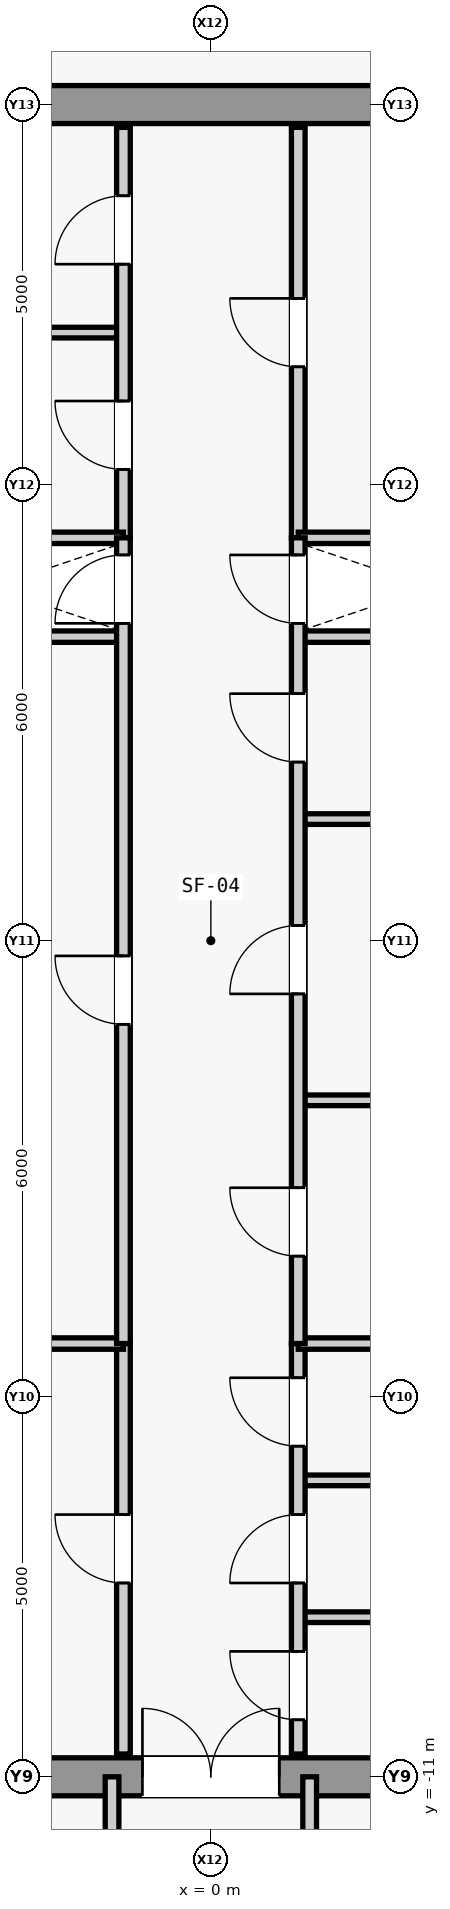
"""IFC4 building model, lengths in metres.
Left out: names, types, materials, properties, quantities, classifications, styles, units other than length and angle.
Written with IfcOpenShell. Run it as: python <this file> out.ifc"""

import sys

from ifc_helpers import new_model, si_unit, direction, frame, frame_2d, origin, place, context, subcontext, project, spatial, rectangle, extrude, source, transform, mapped, element, fill, save


model = new_model("IFC4")
c1 = context("Model", 3, precision=1e-05, world=origin(), true_north=direction((0.0, 1.0)))
c2 = subcontext(c1, "Body", "Model", "MODEL_VIEW")
j1 = project(units=[si_unit("LENGTHUNIT", "METRE"), si_unit("PLANEANGLEUNIT", "RADIAN")], contexts=[c1])
p1 = place(None, origin())
s1 = spatial("IfcSite", under=j1, at=p1, CompositionType="ELEMENT")
p2 = place(p1, origin())
s2 = spatial("IfcBuilding", under=s1, at=p2, CompositionType="ELEMENT")
p3 = place(p2, frame((0.0, 0.0, 342.3)))
s3 = spatial("IfcBuildingStorey", under=s2, at=p3, CompositionType="ELEMENT", Elevation=342.3)
m1 = source(origin(), c2, "Body", "SweptSolid", [
    extrude(rectangle(XDim=9.2, YDim=0.5, at=frame_2d((4.6, 0.0))), origin(), (0.0, 0.0, 1.0), 3.7),
])
p4 = place(p3, frame((-4.6, -11.0, 0.0), z_axis=(0.0, 0.0, 1.0), x_axis=(1.0, 0.0, 0.0)))
e1 = element("IfcWall", 1, at=p4, inside=s3, PredefinedType="SHEAR", context=c2, shape_type="MappedRepresentation", body=[
    mapped(m1, transform((0.0, 0.0, 0.0), scale=1.0)),
])
m2 = source(origin(), c2, "Body", "SweptSolid", [
    extrude(rectangle(XDim=1.8, YDim=2.25, at=frame_2d((0.9, 1.125))), frame((0.0, 0.26, 0.0), z_axis=(0.0, -1.0, 0.0), x_axis=(1.0, 0.0, 0.0)), (0.0, 0.0, 1.0), 0.52),
])
p5 = place(p4, frame((3.7, 0.0, 0.0)))
e2 = element("IfcOpeningElement", 2, at=p5, cuts=e1, PredefinedType="OPENING", context=c2, shape_type="MappedRepresentation", body=[
    mapped(m2, transform((0.0, 0.0, 0.0), scale=1.0)),
])
p6 = place(p3, frame((-4.6, 11.0, 0.0), z_axis=(0.0, 0.0, 1.0), x_axis=(1.0, 0.0, 0.0)))
e3 = element("IfcWall", 3, at=p6, inside=s3, PredefinedType="SHEAR", context=c2, shape_type="MappedRepresentation", body=[
    mapped(m1, transform((0.0, 0.0, 0.0), scale=1.0)),
])
m3 = source(origin(), c2, "Body", "SweptSolid", [
    extrude(rectangle(XDim=3.45, YDim=0.15, at=frame_2d((1.725, 0.0))), origin(), (0.0, 0.0, 1.0), 3.7),
])
for number, where, z_axis, x_axis in (
    (4, (-4.6, 4.0, 0.0), (0.0, 0.0, 1.0), (1.0, 0.0, 0.0)),
    (5, (1.15, 4.0, 0.0), (0.0, 0.0, 1.0), (1.0, 0.0, 0.0)),
):
    element("IfcWall", number, at=place(p3, frame(where, z_axis=z_axis, x_axis=x_axis)), inside=s3, PredefinedType="PARTITIONING", context=c2, shape_type="MappedRepresentation", body=[
        mapped(m3, transform((0.0, 0.0, 0.0), scale=1.0)),
    ])
m4 = source(origin(), c2, "Body", "SweptSolid", [
    extrude(rectangle(XDim=5.4, YDim=0.18, at=frame_2d((2.7, 0.0))), origin(), (0.0, 0.0, 1.0), 3.7),
])
p7 = place(p3, frame((-1.15, -10.7, 0.0), z_axis=(0.0, 0.0, 1.0), x_axis=(0.0, 1.0, 0.0)))
e6 = element("IfcWall", 6, at=p7, inside=s3, PredefinedType="PARTITIONING", context=c2, shape_type="MappedRepresentation", body=[
    mapped(m4, transform((0.0, 0.0, 0.0), scale=1.0)),
])
m5 = source(origin(), c2, "Body", "SweptSolid", [
    extrude(rectangle(XDim=0.9, YDim=2.15, at=frame_2d((0.45, 1.075))), frame((0.0, 0.1, 0.0), z_axis=(0.0, -1.0, 0.0), x_axis=(1.0, 0.0, 0.0)), (0.0, 0.0, 1.0), 0.2),
])
p8 = place(p7, frame((2.25, 0.0, 0.0)))
e7 = element("IfcOpeningElement", 7, at=p8, cuts=e6, PredefinedType="OPENING", context=c2, shape_type="MappedRepresentation", body=[
    mapped(m5, transform((0.0, 0.0, 0.0), scale=1.0)),
])
m6 = source(origin(), c2, "Body", "SweptSolid", [
    extrude(rectangle(XDim=3.45, YDim=0.14, at=frame_2d((1.725, 0.0))), origin(), (0.0, 0.0, 1.0), 3.7),
])
for number, where, z_axis, x_axis in (
    (8, (1.15, -8.9, 0.0), (0.0, 0.0, 1.0), (1.0, 0.0, 0.0)),
    (9, (1.15, -7.1, 0.0), (0.0, 0.0, 1.0), (1.0, 0.0, 0.0)),
):
    element("IfcWall", number, at=place(p3, frame(where, z_axis=z_axis, x_axis=x_axis)), inside=s3, PredefinedType="PARTITIONING", context=c2, shape_type="MappedRepresentation", body=[
        mapped(m6, transform((0.0, 0.0, 0.0), scale=1.0)),
    ])
p9 = place(p3, frame((1.15, -10.7, 0.0), z_axis=(0.0, 0.0, 1.0), x_axis=(0.0, 1.0, 0.0)))
e10 = element("IfcWall", 10, at=p9, inside=s3, PredefinedType="PARTITIONING", context=c2, shape_type="MappedRepresentation", body=[
    mapped(m4, transform((0.0, 0.0, 0.0), scale=1.0)),
])
p10 = place(p9, frame((0.45, 0.0, 0.0)))
e11 = element("IfcOpeningElement", 11, at=p10, cuts=e10, PredefinedType="OPENING", context=c2, shape_type="MappedRepresentation", body=[
    mapped(m5, transform((0.0, 0.0, 0.0), scale=1.0)),
])
p11 = place(p9, frame((2.25, 0.0, 0.0)))
e12 = element("IfcOpeningElement", 12, at=p11, cuts=e10, PredefinedType="OPENING", context=c2, shape_type="MappedRepresentation", body=[
    mapped(m5, transform((0.0, 0.0, 0.0), scale=1.0)),
])
p12 = place(p9, frame((4.05, 0.0, 0.0)))
e13 = element("IfcOpeningElement", 13, at=p12, cuts=e10, PredefinedType="OPENING", context=c2, shape_type="MappedRepresentation", body=[
    mapped(m5, transform((0.0, 0.0, 0.0), scale=1.0)),
])
for number, where, z_axis, x_axis in (
    (14, (-4.6, -5.3, 0.0), (0.0, 0.0, 1.0), (1.0, 0.0, 0.0)),
    (15, (1.15, -5.3, 0.0), (0.0, 0.0, 1.0), (1.0, 0.0, 0.0)),
):
    element("IfcWall", number, at=place(p3, frame(where, z_axis=z_axis, x_axis=x_axis)), inside=s3, PredefinedType="PARTITIONING", context=c2, shape_type="MappedRepresentation", body=[
        mapped(m3, transform((0.0, 0.0, 0.0), scale=1.0)),
    ])
p13 = place(p3, frame((-4.6, 8.0, 0.0), z_axis=(0.0, 0.0, 1.0), x_axis=(1.0, 0.0, 0.0)))
e16 = element("IfcWall", 16, at=p13, inside=s3, PredefinedType="PARTITIONING", context=c2, shape_type="MappedRepresentation", body=[
    mapped(m6, transform((0.0, 0.0, 0.0), scale=1.0)),
])
p14 = place(p3, frame((-1.15, 5.3, 0.0), z_axis=(0.0, 0.0, 1.0), x_axis=(0.0, 1.0, 0.0)))
e17 = element("IfcWall", 17, at=p14, inside=s3, PredefinedType="PARTITIONING", context=c2, shape_type="MappedRepresentation", body=[
    mapped(m4, transform((0.0, 0.0, 0.0), scale=1.0)),
])
p15 = place(p14, frame((0.9, 0.0, 0.0)))
e18 = element("IfcOpeningElement", 18, at=p15, cuts=e17, PredefinedType="OPENING", context=c2, shape_type="MappedRepresentation", body=[
    mapped(m5, transform((0.0, 0.0, 0.0), scale=1.0)),
])
p16 = place(p14, frame((3.6, 0.0, 0.0)))
e19 = element("IfcOpeningElement", 19, at=p16, cuts=e17, PredefinedType="OPENING", context=c2, shape_type="MappedRepresentation", body=[
    mapped(m5, transform((0.0, 0.0, 0.0), scale=1.0)),
])
p17 = place(p3, frame((1.15, 5.3, 0.0), z_axis=(0.0, 0.0, 1.0), x_axis=(0.0, 1.0, 0.0)))
e20 = element("IfcWall", 20, at=p17, inside=s3, PredefinedType="PARTITIONING", context=c2, shape_type="MappedRepresentation", body=[
    mapped(m4, transform((0.0, 0.0, 0.0), scale=1.0)),
])
p18 = place(p17, frame((2.25, 0.0, 0.0)))
e21 = element("IfcOpeningElement", 21, at=p18, cuts=e20, PredefinedType="OPENING", context=c2, shape_type="MappedRepresentation", body=[
    mapped(m5, transform((0.0, 0.0, 0.0), scale=1.0)),
])
for number, where, z_axis, x_axis in (
    (22, (-4.6, 5.3, 0.0), (0.0, 0.0, 1.0), (1.0, 0.0, 0.0)),
    (23, (1.15, 5.3, 0.0), (0.0, 0.0, 1.0), (1.0, 0.0, 0.0)),
):
    element("IfcWall", number, at=place(p3, frame(where, z_axis=z_axis, x_axis=x_axis)), inside=s3, PredefinedType="PARTITIONING", context=c2, shape_type="MappedRepresentation", body=[
        mapped(m3, transform((0.0, 0.0, 0.0), scale=1.0)),
    ])
m7 = source(origin(), c2, "Body", "SweptSolid", [
    extrude(rectangle(XDim=10.6, YDim=0.18, at=frame_2d((5.3, 0.0))), origin(), (0.0, 0.0, 1.0), 3.7),
])
p19 = place(p3, frame((-1.15, -5.3, 0.0), z_axis=(0.0, 0.0, 1.0), x_axis=(0.0, 1.0, 0.0)))
e24 = element("IfcWall", 24, at=p19, inside=s3, PredefinedType="PARTITIONING", context=c2, shape_type="MappedRepresentation", body=[
    mapped(m7, transform((0.0, 0.0, 0.0), scale=1.0)),
])
p20 = place(p19, frame((4.2, 0.0, 0.0)))
e25 = element("IfcOpeningElement", 25, at=p20, cuts=e24, PredefinedType="OPENING", context=c2, shape_type="MappedRepresentation", body=[
    mapped(m5, transform((0.0, 0.0, 0.0), scale=1.0)),
])
p21 = place(p19, frame((9.475, 0.0, 0.0)))
e26 = element("IfcOpeningElement", 26, at=p21, cuts=e24, PredefinedType="OPENING", context=c2, shape_type="MappedRepresentation", body=[
    mapped(m5, transform((0.0, 0.0, 0.0), scale=1.0)),
])
for number, where, z_axis, x_axis in (
    (27, (1.15, -2.1, 0.0), (0.0, 0.0, 1.0), (1.0, 0.0, 0.0)),
    (28, (1.15, 1.6, 0.0), (0.0, 0.0, 1.0), (1.0, 0.0, 0.0)),
):
    element("IfcWall", number, at=place(p3, frame(where, z_axis=z_axis, x_axis=x_axis)), inside=s3, PredefinedType="PARTITIONING", context=c2, shape_type="MappedRepresentation", body=[
        mapped(m6, transform((0.0, 0.0, 0.0), scale=1.0)),
    ])
p22 = place(p3, frame((1.15, -5.3, 0.0), z_axis=(0.0, 0.0, 1.0), x_axis=(0.0, 1.0, 0.0)))
e29 = element("IfcWall", 29, at=p22, inside=s3, PredefinedType="PARTITIONING", context=c2, shape_type="MappedRepresentation", body=[
    mapped(m7, transform((0.0, 0.0, 0.0), scale=1.0)),
])
p23 = place(p22, frame((1.15, 0.0, 0.0)))
e30 = element("IfcOpeningElement", 30, at=p23, cuts=e29, PredefinedType="OPENING", context=c2, shape_type="MappedRepresentation", body=[
    mapped(m5, transform((0.0, 0.0, 0.0), scale=1.0)),
])
p24 = place(p22, frame((4.6, 0.0, 0.0)))
e31 = element("IfcOpeningElement", 31, at=p24, cuts=e29, PredefinedType="OPENING", context=c2, shape_type="MappedRepresentation", body=[
    mapped(m5, transform((0.0, 0.0, 0.0), scale=1.0)),
])
p25 = place(p22, frame((7.65, 0.0, 0.0)))
e32 = element("IfcOpeningElement", 32, at=p25, cuts=e29, PredefinedType="OPENING", context=c2, shape_type="MappedRepresentation", body=[
    mapped(m5, transform((0.0, 0.0, 0.0), scale=1.0)),
])
p26 = place(p22, frame((9.475, 0.0, 0.0)))
e33 = element("IfcOpeningElement", 33, at=p26, cuts=e29, PredefinedType="OPENING", context=c2, shape_type="MappedRepresentation", body=[
    mapped(m5, transform((0.0, 0.0, 0.0), scale=1.0)),
])
m8 = source(origin(), c2, "Body", "SweptSolid", [
    extrude(rectangle(XDim=3.9, YDim=0.18, at=frame_2d((1.95, 0.0))), origin(), (0.0, 0.0, 1.0), 3.7),
])
for number, where, z_axis, x_axis in (
    (34, (-1.3, -14.9, 0.0), (0.0, 0.0, 1.0), (0.0, 1.0, 0.0)),
    (35, (1.3, -14.9, 0.0), (0.0, 0.0, 1.0), (0.0, 1.0, 0.0)),
):
    element("IfcWall", number, at=place(p3, frame(where, z_axis=z_axis, x_axis=x_axis)), inside=s3, PredefinedType="PARTITIONING", context=c2, shape_type="MappedRepresentation", body=[
        mapped(m8, transform((0.0, 0.0, 0.0), scale=1.0)),
    ])
m9 = source(origin(), c2, "Body", "SweptSolid", [
    extrude(rectangle(XDim=0.9, YDim=2.15, at=frame_2d((0.45, 1.075))), frame((0.0, 0.025, 0.0), z_axis=(0.0, -1.0, 0.0), x_axis=(1.0, 0.0, 0.0)), (0.0, 0.0, 1.0), 0.05),
])
p27 = place(p8, origin())
e36 = element("IfcDoor", 36, at=p27, inside=s3, OperationType="SINGLE_SWING_RIGHT", PredefinedType="DOOR", context=c2, shape_type="MappedRepresentation", body=[
    mapped(m9, transform((0.0, 0.0, 0.0), scale=1.0)),
])
fill(e7, e36)
p28 = place(p10, origin())
e37 = element("IfcDoor", 37, at=p28, inside=s3, OperationType="SINGLE_SWING_RIGHT", PredefinedType="DOOR", context=c2, shape_type="MappedRepresentation", body=[
    mapped(m9, transform((0.0, 0.0, 0.0), scale=1.0)),
])
fill(e11, e37)
p29 = place(p11, origin())
e38 = element("IfcDoor", 38, at=p29, inside=s3, OperationType="SINGLE_SWING_LEFT", PredefinedType="DOOR", context=c2, shape_type="MappedRepresentation", body=[
    mapped(m9, transform((0.0, 0.0, 0.0), scale=1.0)),
])
fill(e12, e38)
p30 = place(p12, origin())
e39 = element("IfcDoor", 39, at=p30, inside=s3, OperationType="SINGLE_SWING_RIGHT", PredefinedType="DOOR", context=c2, shape_type="MappedRepresentation", body=[
    mapped(m9, transform((0.0, 0.0, 0.0), scale=1.0)),
])
fill(e13, e39)
m10 = source(origin(), c2, "Body", "SweptSolid", [
    extrude(rectangle(XDim=1.8, YDim=2.25, at=frame_2d((0.9, 1.125))), frame((0.0, 0.025, 0.0), z_axis=(0.0, -1.0, 0.0), x_axis=(1.0, 0.0, 0.0)), (0.0, 0.0, 1.0), 0.05),
])
p31 = place(p5, origin())
e40 = element("IfcDoor", 40, at=p31, inside=s3, OperationType="SINGLE_SWING_LEFT", PredefinedType="DOOR", context=c2, shape_type="MappedRepresentation", body=[
    mapped(m10, transform((0.0, 0.0, 0.0), scale=1.0)),
])
fill(e2, e40)
p32 = place(p15, origin())
e41 = element("IfcDoor", 41, at=p32, inside=s3, OperationType="SINGLE_SWING_RIGHT", PredefinedType="DOOR", context=c2, shape_type="MappedRepresentation", body=[
    mapped(m9, transform((0.0, 0.0, 0.0), scale=1.0)),
])
fill(e18, e41)
p33 = place(p16, origin())
e42 = element("IfcDoor", 42, at=p33, inside=s3, OperationType="SINGLE_SWING_LEFT", PredefinedType="DOOR", context=c2, shape_type="MappedRepresentation", body=[
    mapped(m9, transform((0.0, 0.0, 0.0), scale=1.0)),
])
fill(e19, e42)
p34 = place(p18, origin())
e43 = element("IfcDoor", 43, at=p34, inside=s3, OperationType="SINGLE_SWING_RIGHT", PredefinedType="DOOR", context=c2, shape_type="MappedRepresentation", body=[
    mapped(m9, transform((0.0, 0.0, 0.0), scale=1.0)),
])
fill(e21, e43)
p35 = place(p20, origin())
e44 = element("IfcDoor", 44, at=p35, inside=s3, OperationType="SINGLE_SWING_RIGHT", PredefinedType="DOOR", context=c2, shape_type="MappedRepresentation", body=[
    mapped(m9, transform((0.0, 0.0, 0.0), scale=1.0)),
])
fill(e25, e44)
p36 = place(p23, origin())
e45 = element("IfcDoor", 45, at=p36, inside=s3, OperationType="SINGLE_SWING_RIGHT", PredefinedType="DOOR", context=c2, shape_type="MappedRepresentation", body=[
    mapped(m9, transform((0.0, 0.0, 0.0), scale=1.0)),
])
fill(e30, e45)
p37 = place(p24, origin())
e46 = element("IfcDoor", 46, at=p37, inside=s3, OperationType="SINGLE_SWING_LEFT", PredefinedType="DOOR", context=c2, shape_type="MappedRepresentation", body=[
    mapped(m9, transform((0.0, 0.0, 0.0), scale=1.0)),
])
fill(e31, e46)
p38 = place(p25, origin())
e47 = element("IfcDoor", 47, at=p38, inside=s3, OperationType="SINGLE_SWING_RIGHT", PredefinedType="DOOR", context=c2, shape_type="MappedRepresentation", body=[
    mapped(m9, transform((0.0, 0.0, 0.0), scale=1.0)),
])
fill(e32, e47)
p39 = place(p21, origin())
e48 = element("IfcDoor", 48, at=p39, inside=s3, OperationType="SINGLE_SWING_LEFT", PredefinedType="DOOR", context=c2, shape_type="MappedRepresentation", body=[
    mapped(m9, transform((0.0, 0.0, 0.0), scale=1.0)),
])
fill(e26, e48)
p40 = place(p26, origin())
e49 = element("IfcDoor", 49, at=p40, inside=s3, OperationType="SINGLE_SWING_RIGHT", PredefinedType="DOOR", context=c2, shape_type="MappedRepresentation", body=[
    mapped(m9, transform((0.0, 0.0, 0.0), scale=1.0)),
])
fill(e33, e49)
save(model, sys.argv[1])
